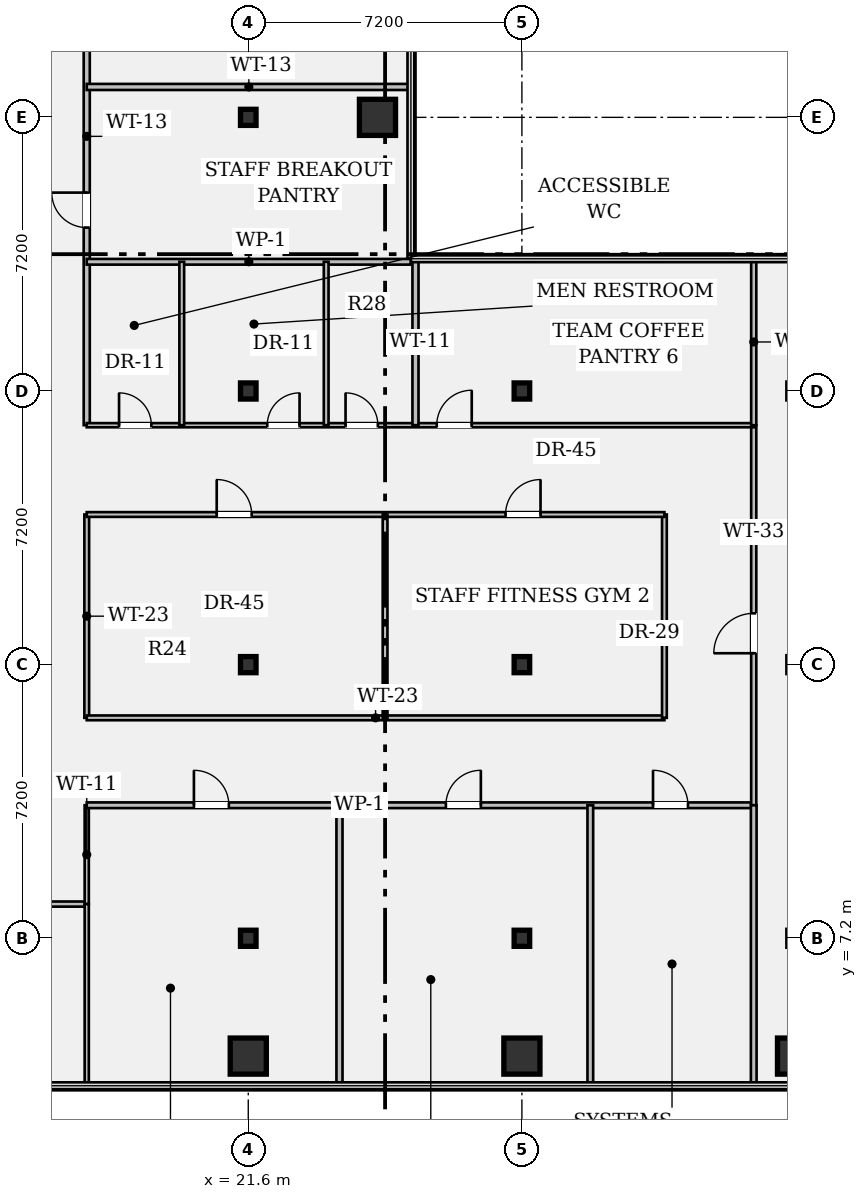
"""IFC4 building model, lengths in metres.
Left out: names, types, materials, properties, quantities, classifications, styles, units other than length and angle.
Written with IfcOpenShell. Run it as: python <this file> out.ifc"""

import sys

from ifc_helpers import new_model, si_unit, direction, frame, frame_2d, origin, origin_2d, place, context, subcontext, project, spatial, rectangle, hollow_rectangle, i_section, extrude, element, fill, save


model = new_model("IFC4")
c1 = context("Model", 3, precision=1e-05, world=origin(), true_north=direction((0.0, 1.0)))
c2 = subcontext(c1, "Body", "Model", "MODEL_VIEW")
j1 = project(units=[si_unit("LENGTHUNIT", "METRE"), si_unit("PLANEANGLEUNIT", "RADIAN")], contexts=[c1])
p1 = place(None, origin())
s1 = spatial("IfcSite", under=j1, at=p1, CompositionType="ELEMENT")
p2 = place(p1, origin())
s2 = spatial("IfcBuilding", under=s1, at=p2, CompositionType="ELEMENT")
p3 = place(p2, frame((0.0, 0.0, 109.9)))
s3 = spatial("IfcBuildingStorey", under=s2, at=p3, CompositionType="ELEMENT", Elevation=109.9)
p4 = place(p3, frame((21.6, 4.1, 0.0), z_axis=(0.0, 0.0, 1.0), x_axis=(1.0, 0.0, 0.0)))
e1 = element("IfcColumn", 1, at=p4, inside=s3, PredefinedType="COLUMN", context=c2, shape_type="SweptSolid", body=[
    extrude(hollow_rectangle(XDim=0.95, YDim=0.95, WallThickness=0.06, at=origin_2d()), origin(), (0.0, 0.0, 1.0), 3.58),
])
for number, where, z_axis, x_axis in (
    (2, (21.6, 7.2, 0.0), (0.0, 0.0, 1.0), (1.0, 0.0, 0.0)),
    (3, (21.6, 14.4, 0.0), (0.0, 0.0, 1.0), (1.0, 0.0, 0.0)),
    (4, (21.6, 21.6, 0.0), (0.0, 0.0, 1.0), (1.0, 0.0, 0.0)),
    (5, (21.6, 28.8, 0.0), (0.0, 0.0, 1.0), (1.0, 0.0, 0.0)),
):
    element("IfcColumn", number, at=place(p3, frame(where, z_axis=z_axis, x_axis=x_axis)), inside=s3, PredefinedType="COLUMN", context=c2, shape_type="SweptSolid", body=[
        extrude(i_section(OverallWidth=0.409, OverallDepth=0.424, WebThickness=0.033, FlangeThickness=0.052, FilletRadius=0.018, at=origin_2d()), origin(), (0.0, 0.0, 1.0), 3.58),
    ])
for number, where, z_axis, x_axis in (
    (6, (25.0, 28.8, 0.0), (0.0, 0.0, 1.0), (1.0, 0.0, 0.0)),
    (7, (28.8, 4.1, 0.0), (0.0, 0.0, 1.0), (1.0, 0.0, 0.0)),
):
    element("IfcColumn", number, at=place(p3, frame(where, z_axis=z_axis, x_axis=x_axis)), inside=s3, PredefinedType="COLUMN", context=c2, shape_type="SweptSolid", body=[
        extrude(hollow_rectangle(XDim=0.95, YDim=0.95, WallThickness=0.06, at=origin_2d()), origin(), (0.0, 0.0, 1.0), 3.58),
    ])
for number, where, z_axis, x_axis in (
    (8, (28.8, 7.2, 0.0), (0.0, 0.0, 1.0), (1.0, 0.0, 0.0)),
    (9, (28.8, 14.4, 0.0), (0.0, 0.0, 1.0), (1.0, 0.0, 0.0)),
    (10, (28.8, 21.6, 0.0), (0.0, 0.0, 1.0), (1.0, 0.0, 0.0)),
):
    element("IfcColumn", number, at=place(p3, frame(where, z_axis=z_axis, x_axis=x_axis)), inside=s3, PredefinedType="COLUMN", context=c2, shape_type="SweptSolid", body=[
        extrude(i_section(OverallWidth=0.409, OverallDepth=0.424, WebThickness=0.033, FlangeThickness=0.052, FilletRadius=0.018, at=origin_2d()), origin(), (0.0, 0.0, 1.0), 3.58),
    ])
p5 = place(p3, frame((36.0, 4.1, 0.0), z_axis=(0.0, 0.0, 1.0), x_axis=(1.0, 0.0, 0.0)))
e11 = element("IfcColumn", 11, at=p5, inside=s3, PredefinedType="COLUMN", context=c2, shape_type="SweptSolid", body=[
    extrude(hollow_rectangle(XDim=0.95, YDim=0.95, WallThickness=0.06, at=origin_2d()), origin(), (0.0, 0.0, 1.0), 3.58),
])
for number, where, z_axis, x_axis in (
    (12, (36.0, 7.2, 0.0), (0.0, 0.0, 1.0), (1.0, 0.0, 0.0)),
    (13, (36.0, 14.4, 0.0), (0.0, 0.0, 1.0), (1.0, 0.0, 0.0)),
    (14, (36.0, 21.6, 0.0), (0.0, 0.0, 1.0), (1.0, 0.0, 0.0)),
):
    element("IfcColumn", number, at=place(p3, frame(where, z_axis=z_axis, x_axis=x_axis)), inside=s3, PredefinedType="COLUMN", context=c2, shape_type="SweptSolid", body=[
        extrude(i_section(OverallWidth=0.409, OverallDepth=0.424, WebThickness=0.033, FlangeThickness=0.052, FilletRadius=0.018, at=origin_2d()), origin(), (0.0, 0.0, 1.0), 3.58),
    ])
p6 = place(p3, frame((14.4, 8.1, 0.0), z_axis=(0.0, 0.0, 1.0), x_axis=(1.0, 0.0, 0.0)))
e15 = element("IfcWall", 15, at=p6, inside=s3, PredefinedType="PARTITIONING", context=c2, shape_type="SweptSolid", body=[
    extrude(rectangle(XDim=2.95, YDim=0.135, at=frame_2d((1.475, 0.0))), origin(), (0.0, 0.0, 1.0), 3.098),
])
p7 = place(p6, frame((0.95, 0.0, 0.0)))
e16 = element("IfcOpeningElement", 16, at=p7, cuts=e15, PredefinedType="OPENING", context=c2, shape_type="SweptSolid", body=[
    extrude(rectangle(XDim=0.92, YDim=2.15, at=frame_2d((0.46, 1.075))), frame((0.0, 0.08, 0.0), z_axis=(0.0, -1.0, 0.0), x_axis=(1.0, 0.0, 0.0)), (0.0, 0.0, 1.0), 0.159),
])
p8 = place(p3, frame((17.35, 8.1, 0.0), z_axis=(0.0, 0.0, 1.0), x_axis=(0.0, 1.0, 0.0)))
e17 = element("IfcWall", 17, at=p8, inside=s3, PredefinedType="PARTITIONING", context=c2, shape_type="SweptSolid", body=[
    extrude(rectangle(XDim=2.6, YDim=0.11, at=frame_2d((1.3, 0.0))), origin(), (0.0, 0.0, 1.0), 3.58),
])
p9 = place(p3, frame((17.35, 20.7, 0.0), z_axis=(0.0, 0.0, 1.0), x_axis=(0.0, 1.0, 0.0)))
e18 = element("IfcWall", 18, at=p9, inside=s3, PredefinedType="PARTITIONING", context=c2, shape_type="SweptSolid", body=[
    extrude(rectangle(XDim=15.2, YDim=0.16, at=frame_2d((7.6, 0.0))), origin(), (0.0, 0.0, 1.0), 2.793),
])
p10 = place(p9, frame((5.2, 0.0, 0.0)))
e19 = element("IfcOpeningElement", 19, at=p10, cuts=e18, PredefinedType="OPENING", context=c2, shape_type="SweptSolid", body=[
    extrude(rectangle(XDim=0.92, YDim=2.15, at=frame_2d((0.46, 1.075))), frame((0.0, 0.092, 0.0), z_axis=(0.0, -1.0, 0.0), x_axis=(1.0, 0.0, 0.0)), (0.0, 0.0, 1.0), 0.184),
])
p11 = place(p9, frame((10.6, 0.0, 0.0)))
e20 = element("IfcOpeningElement", 20, at=p11, cuts=e18, PredefinedType="OPENING", context=c2, shape_type="SweptSolid", body=[
    extrude(rectangle(XDim=1.0, YDim=2.15, at=frame_2d((0.5, 1.075))), frame((0.0, 0.092, 0.0), z_axis=(0.0, -1.0, 0.0), x_axis=(1.0, 0.0, 0.0)), (0.0, 0.0, 1.0), 0.184),
])
p12 = place(p3, frame((17.35, 10.7, 0.0), z_axis=(0.0, 0.0, 1.0), x_axis=(1.0, 0.0, 0.0)))
e21 = element("IfcWall", 21, at=p12, inside=s3, PredefinedType="PARTITIONING", context=c2, shape_type="SweptSolid", body=[
    extrude(rectangle(XDim=17.55, YDim=0.15, at=frame_2d((8.775, 0.0))), origin(), (0.0, 0.0, 1.0), 2.793),
])
p13 = place(p12, frame((2.82, 0.0, 0.0)))
e22 = element("IfcOpeningElement", 22, at=p13, cuts=e21, PredefinedType="OPENING", context=c2, shape_type="SweptSolid", body=[
    extrude(rectangle(XDim=0.92, YDim=2.15, at=frame_2d((0.46, 1.075))), frame((0.0, 0.087, 0.0), z_axis=(0.0, -1.0, 0.0), x_axis=(1.0, 0.0, 0.0)), (0.0, 0.0, 1.0), 0.174),
])
p14 = place(p12, frame((9.45, 0.0, 0.0)))
e23 = element("IfcOpeningElement", 23, at=p14, cuts=e21, PredefinedType="OPENING", context=c2, shape_type="SweptSolid", body=[
    extrude(rectangle(XDim=0.92, YDim=2.15, at=frame_2d((0.46, 1.075))), frame((0.0, 0.087, 0.0), z_axis=(0.0, -1.0, 0.0), x_axis=(1.0, 0.0, 0.0)), (0.0, 0.0, 1.0), 0.174),
])
p15 = place(p12, frame((14.9, 0.0, 0.0)))
e24 = element("IfcOpeningElement", 24, at=p15, cuts=e21, PredefinedType="OPENING", context=c2, shape_type="SweptSolid", body=[
    extrude(rectangle(XDim=0.92, YDim=2.15, at=frame_2d((0.46, 1.075))), frame((0.0, 0.087, 0.0), z_axis=(0.0, -1.0, 0.0), x_axis=(1.0, 0.0, 0.0)), (0.0, 0.0, 1.0), 0.174),
])
p16 = place(p3, frame((34.9, 10.7, 0.0), z_axis=(0.0, 0.0, 1.0), x_axis=(0.0, 1.0, 0.0)))
e25 = element("IfcWall", 25, at=p16, inside=s3, PredefinedType="PARTITIONING", context=c2, shape_type="SweptSolid", body=[
    extrude(rectangle(XDim=10.0, YDim=0.135, at=frame_2d((5.0, 0.0))), origin(), (0.0, 0.0, 1.0), 2.793),
])
p17 = place(p16, frame((4.0, 0.0, 0.0)))
e26 = element("IfcOpeningElement", 26, at=p17, cuts=e25, PredefinedType="OPENING", context=c2, shape_type="SweptSolid", body=[
    extrude(rectangle(XDim=1.05, YDim=2.15, at=frame_2d((0.525, 1.075))), frame((0.0, 0.08, 0.0), z_axis=(0.0, -1.0, 0.0), x_axis=(1.0, 0.0, 0.0)), (0.0, 0.0, 1.0), 0.159),
])
p18 = place(p3, frame((17.35, 20.7, 0.0), z_axis=(0.0, 0.0, 1.0), x_axis=(1.0, 0.0, 0.0)))
e27 = element("IfcWall", 27, at=p18, inside=s3, PredefinedType="PARTITIONING", context=c2, shape_type="SweptSolid", body=[
    extrude(rectangle(XDim=17.55, YDim=0.11, at=frame_2d((8.775, 0.0))), origin(), (0.0, 0.0, 1.0), 2.793),
])
p19 = place(p18, frame((0.85, 0.0, 0.0)))
e28 = element("IfcOpeningElement", 28, at=p19, cuts=e27, PredefinedType="OPENING", context=c2, shape_type="SweptSolid", body=[
    extrude(rectangle(XDim=0.85, YDim=2.15, at=frame_2d((0.425, 1.075))), frame((0.0, 0.067, 0.0), z_axis=(0.0, -1.0, 0.0), x_axis=(1.0, 0.0, 0.0)), (0.0, 0.0, 1.0), 0.134),
])
p20 = place(p18, frame((4.75, 0.0, 0.0)))
e29 = element("IfcOpeningElement", 29, at=p20, cuts=e27, PredefinedType="OPENING", context=c2, shape_type="SweptSolid", body=[
    extrude(rectangle(XDim=0.85, YDim=2.15, at=frame_2d((0.425, 1.075))), frame((0.0, 0.067, 0.0), z_axis=(0.0, -1.0, 0.0), x_axis=(1.0, 0.0, 0.0)), (0.0, 0.0, 1.0), 0.134),
])
p21 = place(p18, frame((6.81, 0.0, 0.0)))
e30 = element("IfcOpeningElement", 30, at=p21, cuts=e27, PredefinedType="OPENING", context=c2, shape_type="SweptSolid", body=[
    extrude(rectangle(XDim=0.85, YDim=2.15, at=frame_2d((0.425, 1.075))), frame((0.0, 0.067, 0.0), z_axis=(0.0, -1.0, 0.0), x_axis=(1.0, 0.0, 0.0)), (0.0, 0.0, 1.0), 0.134),
])
p22 = place(p18, frame((9.21, 0.0, 0.0)))
e31 = element("IfcOpeningElement", 31, at=p22, cuts=e27, PredefinedType="OPENING", context=c2, shape_type="SweptSolid", body=[
    extrude(rectangle(XDim=0.92, YDim=2.15, at=frame_2d((0.46, 1.075))), frame((0.0, 0.067, 0.0), z_axis=(0.0, -1.0, 0.0), x_axis=(1.0, 0.0, 0.0)), (0.0, 0.0, 1.0), 0.134),
])
p23 = place(p3, frame((17.35, 13.0, 0.0), z_axis=(0.0, 0.0, 1.0), x_axis=(0.0, 1.0, 0.0)))
e32 = element("IfcWall", 32, at=p23, inside=s3, PredefinedType="PARTITIONING", context=c2, shape_type="SweptSolid", body=[
    extrude(rectangle(XDim=5.35, YDim=0.125, at=frame_2d((2.675, 0.0))), origin(), (0.0, 0.0, 1.0), 2.793),
])
p24 = place(p3, frame((17.35, 13.0, 0.0), z_axis=(0.0, 0.0, 1.0), x_axis=(1.0, 0.0, 0.0)))
e33 = element("IfcWall", 33, at=p24, inside=s3, PredefinedType="PARTITIONING", context=c2, shape_type="SweptSolid", body=[
    extrude(rectangle(XDim=15.2, YDim=0.125, at=frame_2d((7.6, 0.0))), origin(), (0.0, 0.0, 1.0), 2.793),
])
p25 = place(p3, frame((32.55, 13.0, 0.0), z_axis=(0.0, 0.0, 1.0), x_axis=(0.0, 1.0, 0.0)))
e34 = element("IfcWall", 34, at=p25, inside=s3, PredefinedType="PARTITIONING", context=c2, shape_type="SweptSolid", body=[
    extrude(rectangle(XDim=5.35, YDim=0.125, at=frame_2d((2.675, 0.0))), origin(), (0.0, 0.0, 1.0), 2.793),
])
p26 = place(p3, frame((17.35, 18.35, 0.0), z_axis=(0.0, 0.0, 1.0), x_axis=(1.0, 0.0, 0.0)))
e35 = element("IfcWall", 35, at=p26, inside=s3, PredefinedType="PARTITIONING", context=c2, shape_type="SweptSolid", body=[
    extrude(rectangle(XDim=15.2, YDim=0.125, at=frame_2d((7.6, 0.0))), origin(), (0.0, 0.0, 1.0), 2.793),
])
p27 = place(p26, frame((3.42, 0.0, 0.0)))
e36 = element("IfcOpeningElement", 36, at=p27, cuts=e35, PredefinedType="OPENING", context=c2, shape_type="SweptSolid", body=[
    extrude(rectangle(XDim=0.92, YDim=2.15, at=frame_2d((0.46, 1.075))), frame((0.0, 0.074, 0.0), z_axis=(0.0, -1.0, 0.0), x_axis=(1.0, 0.0, 0.0)), (0.0, 0.0, 1.0), 0.149),
])
p28 = place(p26, frame((11.02, 0.0, 0.0)))
e37 = element("IfcOpeningElement", 37, at=p28, cuts=e35, PredefinedType="OPENING", context=c2, shape_type="SweptSolid", body=[
    extrude(rectangle(XDim=0.92, YDim=2.15, at=frame_2d((0.46, 1.075))), frame((0.0, 0.074, 0.0), z_axis=(0.0, -1.0, 0.0), x_axis=(1.0, 0.0, 0.0)), (0.0, 0.0, 1.0), 0.149),
])
p29 = place(p3, frame((25.2, 13.0, 0.0), z_axis=(0.0, 0.0, 1.0), x_axis=(0.0, 1.0, 0.0)))
e38 = element("IfcWall", 38, at=p29, inside=s3, PredefinedType="PARTITIONING", context=c2, shape_type="SweptSolid", body=[
    extrude(rectangle(XDim=5.35, YDim=0.125, at=frame_2d((2.675, 0.0))), origin(), (0.0, 0.0, 1.0), 2.793),
])
p30 = place(p3, frame((17.35, 25.0, 0.0), z_axis=(0.0, 0.0, 1.0), x_axis=(1.0, 0.0, 0.0)))
e39 = element("IfcWall", 39, at=p30, inside=s3, PredefinedType="PARTITIONING", context=c2, shape_type="SweptSolid", body=[
    extrude(rectangle(XDim=8.53, YDim=0.15, at=frame_2d((4.265, 0.0))), origin(), (0.0, 0.0, 1.0), 2.793),
])
for number, where, z_axis, x_axis in (
    (40, (19.85, 20.7, 0.0), (0.0, 0.0, 1.0), (0.0, 1.0, 0.0)),
    (41, (23.65, 20.7, 0.0), (0.0, 0.0, 1.0), (0.0, 1.0, 0.0)),
):
    element("IfcWall", number, at=place(p3, frame(where, z_axis=z_axis, x_axis=x_axis)), inside=s3, PredefinedType="PARTITIONING", context=c2, shape_type="SweptSolid", body=[
        extrude(rectangle(XDim=4.3, YDim=0.125, at=frame_2d((2.15, 0.0))), origin(), (0.0, 0.0, 1.0), 2.793),
    ])
p31 = place(p3, frame((17.35, 29.6, 0.0), z_axis=(0.0, 0.0, 1.0), x_axis=(1.0, 0.0, 0.0)))
e42 = element("IfcWall", 42, at=p31, inside=s3, PredefinedType="PARTITIONING", context=c2, shape_type="SweptSolid", body=[
    extrude(rectangle(XDim=8.53, YDim=0.16, at=frame_2d((4.265, 0.0))), origin(), (0.0, 0.0, 1.0), 2.793),
])
p32 = place(p3, frame((26.0, 20.7, 0.0), z_axis=(0.0, 0.0, 1.0), x_axis=(0.0, 1.0, 0.0)))
e43 = element("IfcWall", 43, at=p32, inside=s3, PredefinedType="PARTITIONING", context=c2, shape_type="SweptSolid", body=[
    extrude(rectangle(XDim=4.38, YDim=0.16, at=frame_2d((2.19, 0.0))), origin(), (0.0, 0.0, 1.0), 2.793),
])
p33 = place(p3, frame((34.9, 3.32, 0.0), z_axis=(0.0, 0.0, 1.0), x_axis=(0.0, 1.0, 0.0)))
e44 = element("IfcWall", 44, at=p33, inside=s3, PredefinedType="PARTITIONING", context=c2, shape_type="SweptSolid", body=[
    extrude(rectangle(XDim=7.38, YDim=0.15, at=frame_2d((3.69, 0.0))), origin(), (0.0, 0.0, 1.0), 2.793),
])
p34 = place(p3, frame((34.9, 20.7, 0.0), z_axis=(0.0, 0.0, 1.0), x_axis=(0.0, 1.0, 0.0)))
e45 = element("IfcWall", 45, at=p34, inside=s3, PredefinedType="PARTITIONING", context=c2, shape_type="SweptSolid", body=[
    extrude(rectangle(XDim=4.38, YDim=0.135, at=frame_2d((2.19, 0.0))), origin(), (0.0, 0.0, 1.0), 2.793),
])
p35 = place(p3, frame((17.35, 3.32, 0.0), z_axis=(0.0, 0.0, 1.0), x_axis=(0.0, 1.0, 0.0)))
e46 = element("IfcWall", 46, at=p35, inside=s3, PredefinedType="PARTITIONING", context=c2, shape_type="SweptSolid", body=[
    extrude(rectangle(XDim=4.78, YDim=0.11, at=frame_2d((2.39, 0.0))), origin(), (0.0, 0.0, 1.0), 2.793),
])
p36 = place(p3, frame((24.0, 3.32, 0.0), z_axis=(0.0, 0.0, 1.0), x_axis=(0.0, 1.0, 0.0)))
e47 = element("IfcWall", 47, at=p36, inside=s3, PredefinedType="PARTITIONING", context=c2, shape_type="SweptSolid", body=[
    extrude(rectangle(XDim=7.38, YDim=0.16, at=frame_2d((3.69, 0.0))), origin(), (0.0, 0.0, 1.0), 2.793),
])
p37 = place(p3, frame((30.6, 3.32, 0.0), z_axis=(0.0, 0.0, 1.0), x_axis=(0.0, 1.0, 0.0)))
e48 = element("IfcWall", 48, at=p37, inside=s3, PredefinedType="PARTITIONING", context=c2, shape_type="SweptSolid", body=[
    extrude(rectangle(XDim=7.38, YDim=0.15, at=frame_2d((3.69, 0.0))), origin(), (0.0, 0.0, 1.0), 2.793),
])
p38 = place(p27, origin())
e49 = element("IfcDoor", 49, at=p38, inside=s3, OperationType="SINGLE_SWING_LEFT", PredefinedType="DOOR", context=c2, shape_type="SweptSolid", body=[
    extrude(rectangle(XDim=0.92, YDim=2.15, at=frame_2d((0.46, 1.075))), frame((0.0, 0.025, 0.0), z_axis=(0.0, -1.0, 0.0), x_axis=(1.0, 0.0, 0.0)), (0.0, 0.0, 1.0), 0.05),
])
fill(e36, e49)
p39 = place(p28, origin())
e50 = element("IfcDoor", 50, at=p39, inside=s3, OperationType="SINGLE_SWING_RIGHT", PredefinedType="DOOR", context=c2, shape_type="SweptSolid", body=[
    extrude(rectangle(XDim=0.92, YDim=2.15, at=frame_2d((0.46, 1.075))), frame((0.0, 0.025, 0.0), z_axis=(0.0, -1.0, 0.0), x_axis=(1.0, 0.0, 0.0)), (0.0, 0.0, 1.0), 0.05),
])
fill(e37, e50)
p40 = place(p19, origin())
e51 = element("IfcDoor", 51, at=p40, inside=s3, OperationType="SINGLE_SWING_LEFT", PredefinedType="DOOR", context=c2, shape_type="SweptSolid", body=[
    extrude(rectangle(XDim=0.85, YDim=2.15, at=frame_2d((0.425, 1.075))), frame((0.0, 0.025, 0.0), z_axis=(0.0, -1.0, 0.0), x_axis=(1.0, 0.0, 0.0)), (0.0, 0.0, 1.0), 0.05),
])
fill(e28, e51)
p41 = place(p20, origin())
e52 = element("IfcDoor", 52, at=p41, inside=s3, OperationType="SINGLE_SWING_RIGHT", PredefinedType="DOOR", context=c2, shape_type="SweptSolid", body=[
    extrude(rectangle(XDim=0.85, YDim=2.15, at=frame_2d((0.425, 1.075))), frame((0.0, 0.025, 0.0), z_axis=(0.0, -1.0, 0.0), x_axis=(1.0, 0.0, 0.0)), (0.0, 0.0, 1.0), 0.05),
])
fill(e29, e52)
p42 = place(p21, origin())
e53 = element("IfcDoor", 53, at=p42, inside=s3, OperationType="SINGLE_SWING_LEFT", PredefinedType="DOOR", context=c2, shape_type="SweptSolid", body=[
    extrude(rectangle(XDim=0.85, YDim=2.15, at=frame_2d((0.425, 1.075))), frame((0.0, 0.025, 0.0), z_axis=(0.0, -1.0, 0.0), x_axis=(1.0, 0.0, 0.0)), (0.0, 0.0, 1.0), 0.05),
])
fill(e30, e53)
p43 = place(p10, origin())
e54 = element("IfcDoor", 54, at=p43, inside=s3, OperationType="SINGLE_SWING_RIGHT", PredefinedType="DOOR", context=c2, shape_type="SweptSolid", body=[
    extrude(rectangle(XDim=0.92, YDim=2.15, at=frame_2d((0.46, 1.075))), frame((0.0, 0.025, 0.0), z_axis=(0.0, -1.0, 0.0), x_axis=(1.0, 0.0, 0.0)), (0.0, 0.0, 1.0), 0.05),
])
fill(e19, e54)
p44 = place(p22, origin())
e55 = element("IfcDoor", 55, at=p44, inside=s3, OperationType="SINGLE_SWING_RIGHT", PredefinedType="DOOR", context=c2, shape_type="SweptSolid", body=[
    extrude(rectangle(XDim=0.92, YDim=2.15, at=frame_2d((0.46, 1.075))), frame((0.0, 0.025, 0.0), z_axis=(0.0, -1.0, 0.0), x_axis=(1.0, 0.0, 0.0)), (0.0, 0.0, 1.0), 0.05),
])
fill(e31, e55)
p45 = place(p17, origin())
e56 = element("IfcDoor", 56, at=p45, inside=s3, OperationType="SINGLE_SWING_LEFT", PredefinedType="DOOR", context=c2, shape_type="SweptSolid", body=[
    extrude(rectangle(XDim=1.05, YDim=2.15, at=frame_2d((0.525, 1.075))), frame((0.0, 0.025, 0.0), z_axis=(0.0, -1.0, 0.0), x_axis=(1.0, 0.0, 0.0)), (0.0, 0.0, 1.0), 0.05),
])
fill(e26, e56)
p46 = place(p13, origin())
e57 = element("IfcDoor", 57, at=p46, inside=s3, OperationType="SINGLE_SWING_LEFT", PredefinedType="DOOR", context=c2, shape_type="SweptSolid", body=[
    extrude(rectangle(XDim=0.92, YDim=2.15, at=frame_2d((0.46, 1.075))), frame((0.0, 0.025, 0.0), z_axis=(0.0, -1.0, 0.0), x_axis=(1.0, 0.0, 0.0)), (0.0, 0.0, 1.0), 0.05),
])
fill(e22, e57)
p47 = place(p14, origin())
e58 = element("IfcDoor", 58, at=p47, inside=s3, OperationType="SINGLE_SWING_RIGHT", PredefinedType="DOOR", context=c2, shape_type="SweptSolid", body=[
    extrude(rectangle(XDim=0.92, YDim=2.15, at=frame_2d((0.46, 1.075))), frame((0.0, 0.025, 0.0), z_axis=(0.0, -1.0, 0.0), x_axis=(1.0, 0.0, 0.0)), (0.0, 0.0, 1.0), 0.05),
])
fill(e23, e58)
p48 = place(p15, origin())
e59 = element("IfcDoor", 59, at=p48, inside=s3, OperationType="SINGLE_SWING_LEFT", PredefinedType="DOOR", context=c2, shape_type="SweptSolid", body=[
    extrude(rectangle(XDim=0.92, YDim=2.15, at=frame_2d((0.46, 1.075))), frame((0.0, 0.025, 0.0), z_axis=(0.0, -1.0, 0.0), x_axis=(1.0, 0.0, 0.0)), (0.0, 0.0, 1.0), 0.05),
])
fill(e24, e59)
save(model, sys.argv[1])
